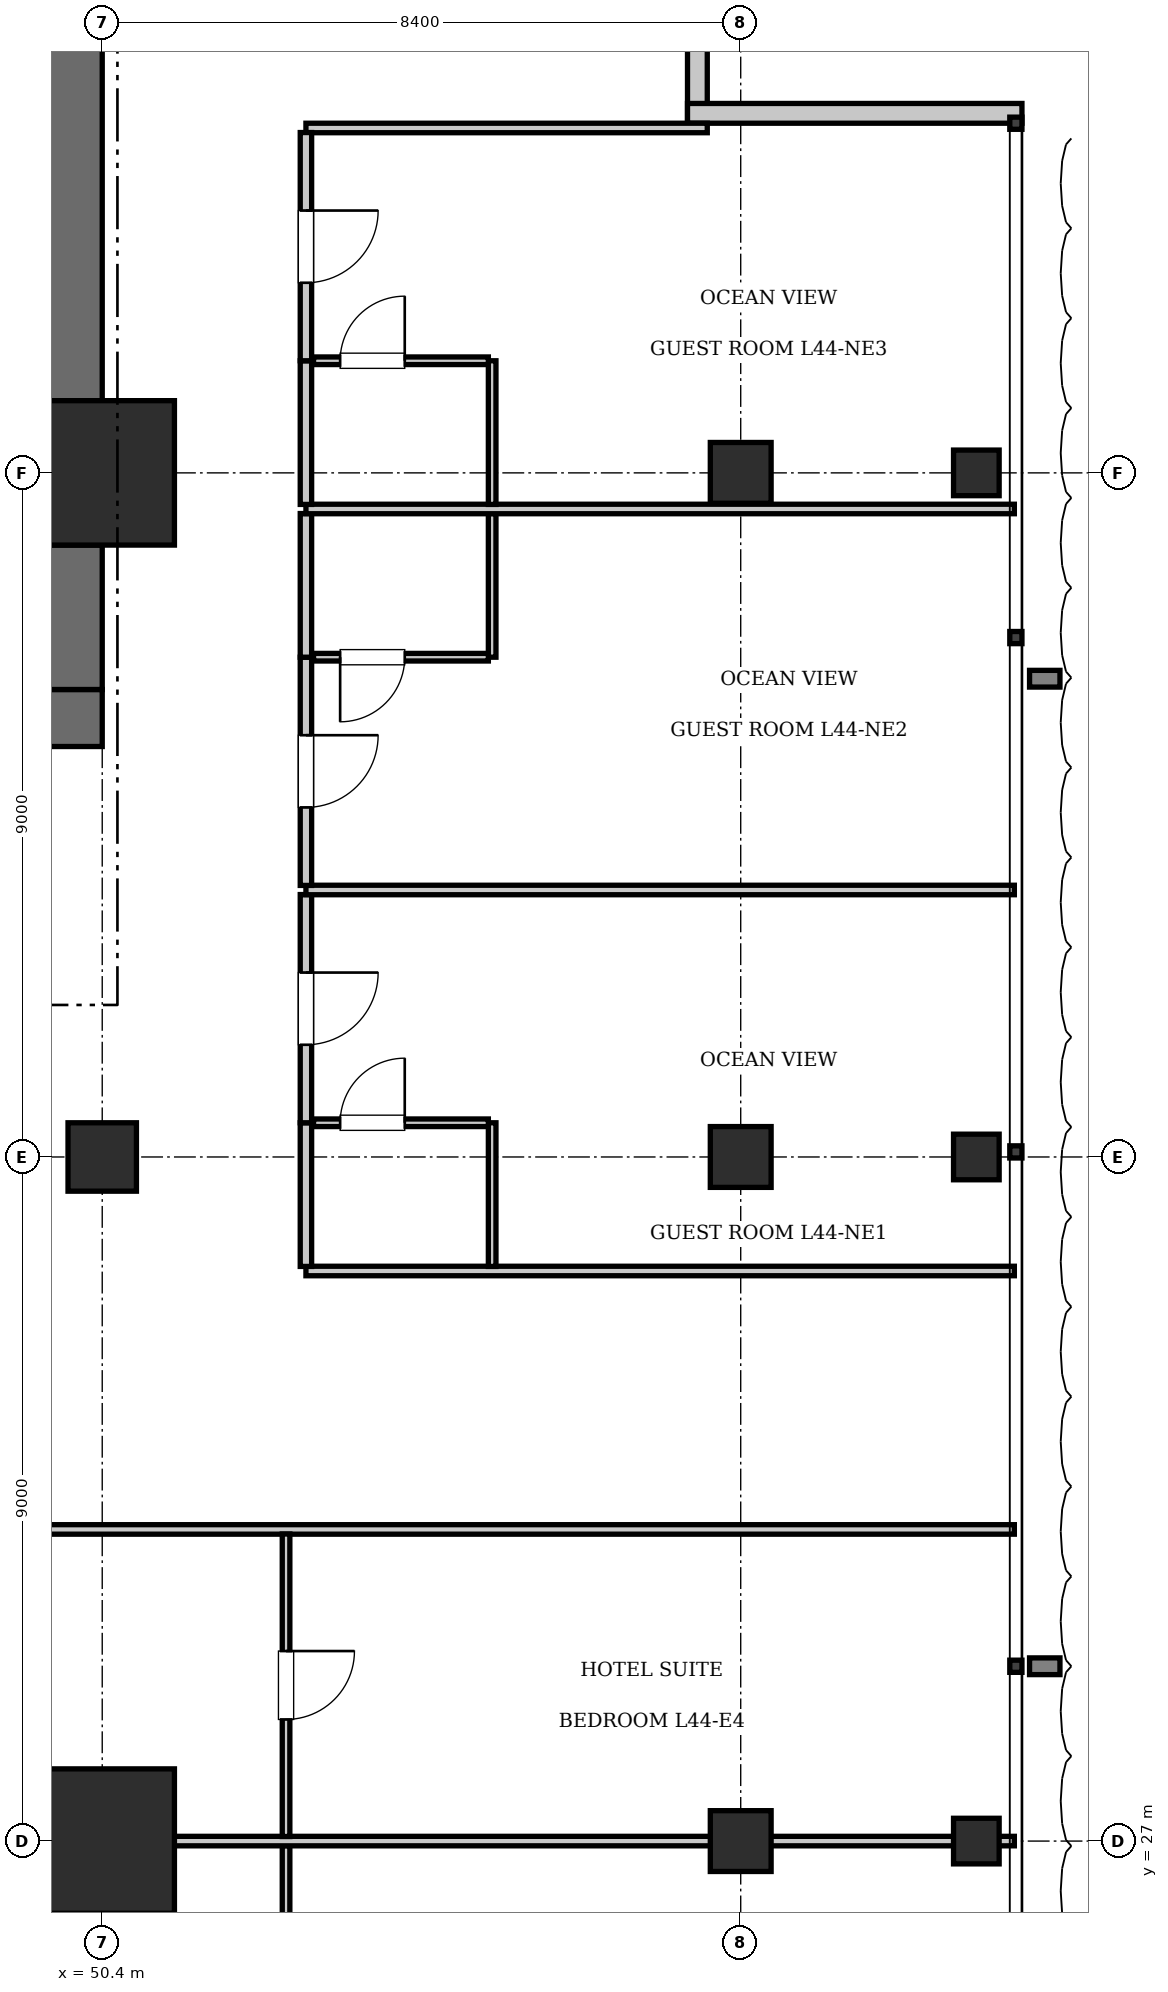
"""IFC4 building model, lengths in metres.
Left out: names, types, materials, properties, quantities, classifications, styles, units other than length and angle.
Written with IfcOpenShell. Run it as: python <this file> out.ifc"""

import sys

from ifc_helpers import new_model, si_unit, direction, frame, frame_2d, origin, origin_2d, place, context, subcontext, project, spatial, rectangle, i_section, extrude, element, fill, save


model = new_model("IFC4")
c1 = context("Model", 3, precision=1e-05, world=origin(), true_north=direction((0.0, 1.0)))
c2 = subcontext(c1, "Body", "Model", "MODEL_VIEW")
j1 = project(units=[si_unit("LENGTHUNIT", "METRE"), si_unit("PLANEANGLEUNIT", "RADIAN")], contexts=[c1])
p1 = place(None, origin())
s1 = spatial("IfcSite", under=j1, at=p1, CompositionType="ELEMENT")
p2 = place(p1, origin())
s2 = spatial("IfcBuilding", under=s1, at=p2, CompositionType="ELEMENT")
p3 = place(p2, frame((0.0, 0.0, 181.3)))
s3 = spatial("IfcBuildingStorey", under=s2, at=p3, CompositionType="ELEMENT", Elevation=181.3)
for number, where, z_axis, x_axis in (
    (1, (50.4, 27.0, 0.0), (0.0, 0.0, 1.0), (1.0, 0.0, 0.0)),
    (2, (50.4, 45.0, 0.0), (0.0, 0.0, 1.0), (1.0, 0.0, 0.0)),
):
    element("IfcColumn", number, at=place(p3, frame(where, z_axis=z_axis, x_axis=x_axis)), inside=s3, PredefinedType="COLUMN", context=c2, shape_type="SweptSolid", body=[
        extrude(rectangle(XDim=1.9, YDim=1.9, at=origin_2d()), origin(), (0.0, 0.0, 1.0), 3.85),
    ])
p4 = place(p3, frame((43.6, 41.775, 0.0), z_axis=(0.0, 0.0, 1.0), x_axis=(1.0, 0.0, 0.0)))
e3 = element("IfcWall", 3, at=p4, inside=s3, PredefinedType="SHEAR", context=c2, shape_type="SweptSolid", body=[
    extrude(rectangle(XDim=6.8, YDim=0.75, at=frame_2d((3.4, 0.0))), origin(), (0.0, 0.0, 1.0), 3.85),
])
p5 = place(p4, frame((3.9, 0.0, 0.0)))
e4 = element("IfcOpeningElement", 4, at=p5, cuts=e3, PredefinedType="OPENING", context=c2, shape_type="SweptSolid", body=[
    extrude(rectangle(XDim=1.15, YDim=2.15, at=frame_2d((0.575, 1.075))), frame((0.0, 0.385, 0.0), z_axis=(0.0, -1.0, 0.0), x_axis=(1.0, 0.0, 0.0)), (0.0, 0.0, 1.0), 0.77),
])
p6 = place(p4, frame((0.55, 0.0, 0.0)))
e5 = element("IfcOpeningElement", 5, at=p6, cuts=e3, PredefinedType="OPENING", context=c2, shape_type="SweptSolid", body=[
    extrude(rectangle(XDim=1.1, YDim=2.2, at=frame_2d((0.55, 1.1))), frame((0.0, 0.385, 0.0), z_axis=(0.0, -1.0, 0.0), x_axis=(1.0, 0.0, 0.0)), (0.0, 0.0, 1.0), 0.77),
])
p7 = place(p3, frame((50.025, 42.15, 0.0), z_axis=(0.0, 0.0, 1.0), x_axis=(0.0, 1.0, 0.0)))
e6 = element("IfcWall", 6, at=p7, inside=s3, PredefinedType="SHEAR", context=c2, shape_type="SweptSolid", body=[
    extrude(rectangle(XDim=1.9, YDim=0.75, at=frame_2d((0.95, 0.0))), origin(), (0.0, 0.0, 1.0), 3.85),
])
p8 = place(p3, frame((50.025, 45.95, 0.0), z_axis=(0.0, 0.0, 1.0), x_axis=(0.0, 1.0, 0.0)))
e7 = element("IfcWall", 7, at=p8, inside=s3, PredefinedType="SHEAR", context=c2, shape_type="SweptSolid", body=[
    extrude(rectangle(XDim=7.3, YDim=0.75, at=frame_2d((3.65, 0.0))), origin(), (0.0, 0.0, 1.0), 3.85),
])
p9 = place(p3, frame((50.4, 36.0, 0.0), z_axis=(0.0, 0.0, 1.0), x_axis=(1.0, 0.0, 0.0)))
e8 = element("IfcColumn", 8, at=p9, inside=s3, PredefinedType="COLUMN", context=c2, shape_type="SweptSolid", body=[
    extrude(rectangle(XDim=0.9, YDim=0.9, at=origin_2d()), origin(), (0.0, 0.0, 1.0), 3.85),
])
for number, where, z_axis, x_axis in (
    (9, (58.8, 27.0, 0.0), (0.0, 0.0, 1.0), (1.0, 0.0, 0.0)),
    (10, (58.8, 36.0, 0.0), (0.0, 0.0, 1.0), (1.0, 0.0, 0.0)),
    (11, (58.8, 45.0, 0.0), (0.0, 0.0, 1.0), (1.0, 0.0, 0.0)),
):
    element("IfcColumn", number, at=place(p3, frame(where, z_axis=z_axis, x_axis=x_axis)), inside=s3, PredefinedType="COLUMN", context=c2, shape_type="SweptSolid", body=[
        extrude(rectangle(XDim=0.8, YDim=0.8, at=origin_2d()), origin(), (0.0, 0.0, 1.0), 3.85),
    ])
for number, where, z_axis, x_axis in (
    (12, (61.9, 27.0, 0.0), (0.0, 0.0, 1.0), (1.0, 0.0, 0.0)),
    (13, (61.9, 36.0, 0.0), (0.0, 0.0, 1.0), (1.0, 0.0, 0.0)),
    (14, (61.9, 45.0, 0.0), (0.0, 0.0, 1.0), (1.0, 0.0, 0.0)),
):
    element("IfcColumn", number, at=place(p3, frame(where, z_axis=z_axis, x_axis=x_axis)), inside=s3, PredefinedType="COLUMN", context=c2, shape_type="SweptSolid", body=[
        extrude(i_section(OverallWidth=0.6, OverallDepth=0.6, WebThickness=0.025, FlangeThickness=0.038, at=origin_2d()), origin(), (0.0, 0.0, 1.0), 3.85),
    ])
for number, where, z_axis, x_axis in (
    (15, (58.23, 54.0, 0.0), (0.0, 0.0, 1.0), (0.0, -1.0, 0.0)),
    (16, (58.1, 49.73, 0.0), (0.0, 0.0, 1.0), (1.0, 0.0, 0.0)),
):
    element("IfcWall", number, at=place(p3, frame(where, z_axis=z_axis, x_axis=x_axis)), inside=s3, PredefinedType="SOLIDWALL", context=c2, shape_type="SweptSolid", body=[
        extrude(rectangle(XDim=4.4, YDim=0.26, at=frame_2d((2.2, 0.0))), origin(), (0.0, 0.0, 1.0), 3.61),
    ])
p10 = place(p3, frame((39.88, 31.1, 0.0), z_axis=(0.0, 0.0, 1.0), x_axis=(1.0, 0.0, 0.0)))
e17 = element("IfcWall", 17, at=p10, inside=s3, PredefinedType="PARTITIONING", context=c2, shape_type="SweptSolid", body=[
    extrude(rectangle(XDim=22.52, YDim=0.125, at=frame_2d((11.26, 0.0))), origin(), (0.0, 0.0, 1.0), 3.61),
])
p11 = place(p3, frame((52.818, 22.96, 0.0), z_axis=(0.0, 0.0, 1.0), x_axis=(0.0, 1.0, 0.0)))
e18 = element("IfcWall", 18, at=p11, inside=s3, PredefinedType="PARTITIONING", context=c2, shape_type="SweptSolid", body=[
    extrude(rectangle(XDim=3.98, YDim=0.1, at=frame_2d((1.99, 0.0))), origin(), (0.0, 0.0, 1.0), 3.61),
])
p12 = place(p11, frame((1.54, 0.0, 0.0)))
e19 = element("IfcOpeningElement", 19, at=p12, cuts=e18, PredefinedType="OPENING", context=c2, shape_type="SweptSolid", body=[
    extrude(rectangle(XDim=0.9, YDim=2.1, at=frame_2d((0.45, 1.05))), frame((0.0, 0.06, 0.0), z_axis=(0.0, -1.0, 0.0), x_axis=(1.0, 0.0, 0.0)), (0.0, 0.0, 1.0), 0.12),
])
p13 = place(p3, frame((39.88, 27.0, 0.0), z_axis=(0.0, 0.0, 1.0), x_axis=(1.0, 0.0, 0.0)))
e20 = element("IfcWall", 20, at=p13, inside=s3, PredefinedType="PARTITIONING", context=c2, shape_type="SweptSolid", body=[
    extrude(rectangle(XDim=22.52, YDim=0.125, at=frame_2d((11.26, 0.0))), origin(), (0.0, 0.0, 1.0), 2.41),
])
p14 = place(p3, frame((52.818, 27.06, 0.0), z_axis=(0.0, 0.0, 1.0), x_axis=(0.0, 1.0, 0.0)))
e21 = element("IfcWall", 21, at=p14, inside=s3, PredefinedType="PARTITIONING", context=c2, shape_type="SweptSolid", body=[
    extrude(rectangle(XDim=3.98, YDim=0.1, at=frame_2d((1.99, 0.0))), origin(), (0.0, 0.0, 1.0), 3.61),
])
p15 = place(p14, frame((1.54, 0.0, 0.0)))
e22 = element("IfcOpeningElement", 22, at=p15, cuts=e21, PredefinedType="OPENING", context=c2, shape_type="SweptSolid", body=[
    extrude(rectangle(XDim=0.9, YDim=2.1, at=frame_2d((0.45, 1.05))), frame((0.0, 0.06, 0.0), z_axis=(0.0, -1.0, 0.0), x_axis=(1.0, 0.0, 0.0)), (0.0, 0.0, 1.0), 0.12),
])
p16 = place(p3, frame((53.08, 34.5, 0.0), z_axis=(0.0, 0.0, 1.0), x_axis=(1.0, 0.0, 0.0)))
e23 = element("IfcWall", 23, at=p16, inside=s3, PredefinedType="PARTITIONING", context=c2, shape_type="SweptSolid", body=[
    extrude(rectangle(XDim=9.32, YDim=0.125, at=frame_2d((4.66, 0.0))), origin(), (0.0, 0.0, 1.0), 3.61),
])
p17 = place(p3, frame((53.08, 49.538, 0.0), z_axis=(0.0, 0.0, 1.0), x_axis=(1.0, 0.0, 0.0)))
e24 = element("IfcWall", 24, at=p17, inside=s3, PredefinedType="PARTITIONING", context=c2, shape_type="SweptSolid", body=[
    extrude(rectangle(XDim=5.28, YDim=0.125, at=frame_2d((2.64, 0.0))), origin(), (0.0, 0.0, 1.0), 3.61),
])
p18 = place(p3, frame((53.08, 34.56, 0.0), z_axis=(0.0, 0.0, 1.0), x_axis=(0.0, 1.0, 0.0)))
e25 = element("IfcWall", 25, at=p18, inside=s3, PredefinedType="PARTITIONING", context=c2, shape_type="SweptSolid", body=[
    extrude(rectangle(XDim=1.89, YDim=0.15, at=frame_2d((0.945, 0.0))), origin(), (0.0, 0.0, 1.0), 3.61),
])
p19 = place(p3, frame((53.08, 36.45, 0.0), z_axis=(0.0, 0.0, 1.0), x_axis=(0.0, 1.0, 0.0)))
e26 = element("IfcWall", 26, at=p19, inside=s3, PredefinedType="PARTITIONING", context=c2, shape_type="SweptSolid", body=[
    extrude(rectangle(XDim=3.002, YDim=0.15, at=frame_2d((1.501, 0.0))), origin(), (0.0, 0.0, 1.0), 3.61),
])
p20 = place(p19, frame((1.026, 0.0, 0.0)))
e27 = element("IfcOpeningElement", 27, at=p20, cuts=e26, PredefinedType="OPENING", context=c2, shape_type="SweptSolid", body=[
    extrude(rectangle(XDim=0.95, YDim=2.15, at=frame_2d((0.475, 1.075))), frame((0.0, 0.085, 0.0), z_axis=(0.0, -1.0, 0.0), x_axis=(1.0, 0.0, 0.0)), (0.0, 0.0, 1.0), 0.17),
])
p21 = place(p3, frame((55.53, 34.56, 0.0), z_axis=(0.0, 0.0, 1.0), x_axis=(0.0, 1.0, 0.0)))
e28 = element("IfcWall", 28, at=p21, inside=s3, PredefinedType="PARTITIONING", context=c2, shape_type="SweptSolid", body=[
    extrude(rectangle(XDim=1.89, YDim=0.1, at=frame_2d((0.945, 0.0))), origin(), (0.0, 0.0, 1.0), 3.61),
])
p22 = place(p3, frame((53.18, 36.45, 0.0), z_axis=(0.0, 0.0, 1.0), x_axis=(1.0, 0.0, 0.0)))
e29 = element("IfcWall", 29, at=p22, inside=s3, PredefinedType="PARTITIONING", context=c2, shape_type="SweptSolid", body=[
    extrude(rectangle(XDim=2.3, YDim=0.1, at=frame_2d((1.15, 0.0))), origin(), (0.0, 0.0, 1.0), 3.61),
])
p23 = place(p22, frame((0.35, 0.0, 0.0)))
e30 = element("IfcOpeningElement", 30, at=p23, cuts=e29, PredefinedType="OPENING", context=c2, shape_type="SweptSolid", body=[
    extrude(rectangle(XDim=0.85, YDim=2.1, at=frame_2d((0.425, 1.05))), frame((0.0, 0.06, 0.0), z_axis=(0.0, -1.0, 0.0), x_axis=(1.0, 0.0, 0.0)), (0.0, 0.0, 1.0), 0.12),
])
p24 = place(p3, frame((53.08, 39.512, 0.0), z_axis=(0.0, 0.0, 1.0), x_axis=(1.0, 0.0, 0.0)))
e31 = element("IfcWall", 31, at=p24, inside=s3, PredefinedType="PARTITIONING", context=c2, shape_type="SweptSolid", body=[
    extrude(rectangle(XDim=9.32, YDim=0.125, at=frame_2d((4.66, 0.0))), origin(), (0.0, 0.0, 1.0), 3.61),
])
p25 = place(p3, frame((53.08, 39.573, 0.0), z_axis=(0.0, 0.0, 1.0), x_axis=(0.0, 1.0, 0.0)))
e32 = element("IfcWall", 32, at=p25, inside=s3, PredefinedType="PARTITIONING", context=c2, shape_type="SweptSolid", body=[
    extrude(rectangle(XDim=3.002, YDim=0.15, at=frame_2d((1.501, 0.0))), origin(), (0.0, 0.0, 1.0), 3.61),
])
p26 = place(p25, frame((1.026, 0.0, 0.0)))
e33 = element("IfcOpeningElement", 33, at=p26, cuts=e32, PredefinedType="OPENING", context=c2, shape_type="SweptSolid", body=[
    extrude(rectangle(XDim=0.95, YDim=2.15, at=frame_2d((0.475, 1.075))), frame((0.0, 0.085, 0.0), z_axis=(0.0, -1.0, 0.0), x_axis=(1.0, 0.0, 0.0)), (0.0, 0.0, 1.0), 0.17),
])
p27 = place(p3, frame((53.08, 42.575, 0.0), z_axis=(0.0, 0.0, 1.0), x_axis=(0.0, 1.0, 0.0)))
e34 = element("IfcWall", 34, at=p27, inside=s3, PredefinedType="PARTITIONING", context=c2, shape_type="SweptSolid", body=[
    extrude(rectangle(XDim=1.89, YDim=0.15, at=frame_2d((0.945, 0.0))), origin(), (0.0, 0.0, 1.0), 3.61),
])
p28 = place(p3, frame((55.53, 42.575, 0.0), z_axis=(0.0, 0.0, 1.0), x_axis=(0.0, 1.0, 0.0)))
e35 = element("IfcWall", 35, at=p28, inside=s3, PredefinedType="PARTITIONING", context=c2, shape_type="SweptSolid", body=[
    extrude(rectangle(XDim=1.89, YDim=0.1, at=frame_2d((0.945, 0.0))), origin(), (0.0, 0.0, 1.0), 3.61),
])
p29 = place(p3, frame((53.18, 42.575, 0.0), z_axis=(0.0, 0.0, 1.0), x_axis=(1.0, 0.0, 0.0)))
e36 = element("IfcWall", 36, at=p29, inside=s3, PredefinedType="PARTITIONING", context=c2, shape_type="SweptSolid", body=[
    extrude(rectangle(XDim=2.3, YDim=0.1, at=frame_2d((1.15, 0.0))), origin(), (0.0, 0.0, 1.0), 3.61),
])
p30 = place(p29, frame((0.35, 0.0, 0.0)))
e37 = element("IfcOpeningElement", 37, at=p30, cuts=e36, PredefinedType="OPENING", context=c2, shape_type="SweptSolid", body=[
    extrude(rectangle(XDim=0.85, YDim=2.1, at=frame_2d((0.425, 1.05))), frame((0.0, 0.06, 0.0), z_axis=(0.0, -1.0, 0.0), x_axis=(1.0, 0.0, 0.0)), (0.0, 0.0, 1.0), 0.12),
])
p31 = place(p3, frame((53.08, 44.525, 0.0), z_axis=(0.0, 0.0, 1.0), x_axis=(1.0, 0.0, 0.0)))
e38 = element("IfcWall", 38, at=p31, inside=s3, PredefinedType="PARTITIONING", context=c2, shape_type="SweptSolid", body=[
    extrude(rectangle(XDim=9.32, YDim=0.125, at=frame_2d((4.66, 0.0))), origin(), (0.0, 0.0, 1.0), 3.61),
])
p32 = place(p3, frame((53.08, 44.585, 0.0), z_axis=(0.0, 0.0, 1.0), x_axis=(0.0, 1.0, 0.0)))
e39 = element("IfcWall", 39, at=p32, inside=s3, PredefinedType="PARTITIONING", context=c2, shape_type="SweptSolid", body=[
    extrude(rectangle(XDim=1.89, YDim=0.15, at=frame_2d((0.945, 0.0))), origin(), (0.0, 0.0, 1.0), 3.61),
])
p33 = place(p3, frame((53.08, 46.475, 0.0), z_axis=(0.0, 0.0, 1.0), x_axis=(0.0, 1.0, 0.0)))
e40 = element("IfcWall", 40, at=p33, inside=s3, PredefinedType="PARTITIONING", context=c2, shape_type="SweptSolid", body=[
    extrude(rectangle(XDim=3.002, YDim=0.15, at=frame_2d((1.501, 0.0))), origin(), (0.0, 0.0, 1.0), 3.61),
])
p34 = place(p33, frame((1.026, 0.0, 0.0)))
e41 = element("IfcOpeningElement", 41, at=p34, cuts=e40, PredefinedType="OPENING", context=c2, shape_type="SweptSolid", body=[
    extrude(rectangle(XDim=0.95, YDim=2.15, at=frame_2d((0.475, 1.075))), frame((0.0, 0.085, 0.0), z_axis=(0.0, -1.0, 0.0), x_axis=(1.0, 0.0, 0.0)), (0.0, 0.0, 1.0), 0.17),
])
p35 = place(p3, frame((55.53, 44.585, 0.0), z_axis=(0.0, 0.0, 1.0), x_axis=(0.0, 1.0, 0.0)))
e42 = element("IfcWall", 42, at=p35, inside=s3, PredefinedType="PARTITIONING", context=c2, shape_type="SweptSolid", body=[
    extrude(rectangle(XDim=1.89, YDim=0.1, at=frame_2d((0.945, 0.0))), origin(), (0.0, 0.0, 1.0), 3.61),
])
p36 = place(p3, frame((53.18, 46.475, 0.0), z_axis=(0.0, 0.0, 1.0), x_axis=(1.0, 0.0, 0.0)))
e43 = element("IfcWall", 43, at=p36, inside=s3, PredefinedType="PARTITIONING", context=c2, shape_type="SweptSolid", body=[
    extrude(rectangle(XDim=2.3, YDim=0.1, at=frame_2d((1.15, 0.0))), origin(), (0.0, 0.0, 1.0), 3.61),
])
p37 = place(p36, frame((0.35, 0.0, 0.0)))
e44 = element("IfcOpeningElement", 44, at=p37, cuts=e43, PredefinedType="OPENING", context=c2, shape_type="SweptSolid", body=[
    extrude(rectangle(XDim=0.85, YDim=2.1, at=frame_2d((0.425, 1.05))), frame((0.0, 0.06, 0.0), z_axis=(0.0, -1.0, 0.0), x_axis=(1.0, 0.0, 0.0)), (0.0, 0.0, 1.0), 0.12),
])
p38 = place(p15, frame((0.9, 0.0, 0.0), z_axis=(0.0, 0.0, 1.0), x_axis=(-1.0, 0.0, 0.0)))
e45 = element("IfcDoor", 45, at=p38, inside=s3, OperationType="SINGLE_SWING_LEFT", PredefinedType="DOOR", context=c2, shape_type="SweptSolid", body=[
    extrude(rectangle(XDim=0.9, YDim=2.1, at=frame_2d((0.45, 1.05))), frame((0.0, 0.025, 0.0), z_axis=(0.0, -1.0, 0.0), x_axis=(1.0, 0.0, 0.0)), (0.0, 0.0, 1.0), 0.05),
])
fill(e22, e45)
p39 = place(p23, origin())
e46 = element("IfcDoor", 46, at=p39, inside=s3, OperationType="SINGLE_SWING_RIGHT", PredefinedType="DOOR", context=c2, shape_type="SweptSolid", body=[
    extrude(rectangle(XDim=0.85, YDim=2.1, at=frame_2d((0.425, 1.05))), frame((0.0, 0.025, 0.0), z_axis=(0.0, -1.0, 0.0), x_axis=(1.0, 0.0, 0.0)), (0.0, 0.0, 1.0), 0.05),
])
fill(e30, e46)
p40 = place(p20, frame((0.95, 0.0, 0.0), z_axis=(0.0, 0.0, 1.0), x_axis=(-1.0, 0.0, 0.0)))
e47 = element("IfcDoor", 47, at=p40, inside=s3, OperationType="SINGLE_SWING_LEFT", PredefinedType="DOOR", context=c2, shape_type="SweptSolid", body=[
    extrude(rectangle(XDim=0.95, YDim=2.15, at=frame_2d((0.475, 1.075))), frame((0.0, 0.025, 0.0), z_axis=(0.0, -1.0, 0.0), x_axis=(1.0, 0.0, 0.0)), (0.0, 0.0, 1.0), 0.05),
])
fill(e27, e47)
p41 = place(p30, frame((0.85, 0.0, 0.0), z_axis=(0.0, 0.0, 1.0), x_axis=(-1.0, 0.0, 0.0)))
e48 = element("IfcDoor", 48, at=p41, inside=s3, OperationType="SINGLE_SWING_RIGHT", PredefinedType="DOOR", context=c2, shape_type="SweptSolid", body=[
    extrude(rectangle(XDim=0.85, YDim=2.1, at=frame_2d((0.425, 1.05))), frame((0.0, 0.025, 0.0), z_axis=(0.0, -1.0, 0.0), x_axis=(1.0, 0.0, 0.0)), (0.0, 0.0, 1.0), 0.05),
])
fill(e37, e48)
p42 = place(p26, frame((0.95, 0.0, 0.0), z_axis=(0.0, 0.0, 1.0), x_axis=(-1.0, 0.0, 0.0)))
e49 = element("IfcDoor", 49, at=p42, inside=s3, OperationType="SINGLE_SWING_LEFT", PredefinedType="DOOR", context=c2, shape_type="SweptSolid", body=[
    extrude(rectangle(XDim=0.95, YDim=2.15, at=frame_2d((0.475, 1.075))), frame((0.0, 0.025, 0.0), z_axis=(0.0, -1.0, 0.0), x_axis=(1.0, 0.0, 0.0)), (0.0, 0.0, 1.0), 0.05),
])
fill(e33, e49)
p43 = place(p37, origin())
e50 = element("IfcDoor", 50, at=p43, inside=s3, OperationType="SINGLE_SWING_RIGHT", PredefinedType="DOOR", context=c2, shape_type="SweptSolid", body=[
    extrude(rectangle(XDim=0.85, YDim=2.1, at=frame_2d((0.425, 1.05))), frame((0.0, 0.025, 0.0), z_axis=(0.0, -1.0, 0.0), x_axis=(1.0, 0.0, 0.0)), (0.0, 0.0, 1.0), 0.05),
])
fill(e44, e50)
p44 = place(p34, frame((0.95, 0.0, 0.0), z_axis=(0.0, 0.0, 1.0), x_axis=(-1.0, 0.0, 0.0)))
e51 = element("IfcDoor", 51, at=p44, inside=s3, OperationType="SINGLE_SWING_LEFT", PredefinedType="DOOR", context=c2, shape_type="SweptSolid", body=[
    extrude(rectangle(XDim=0.95, YDim=2.15, at=frame_2d((0.475, 1.075))), frame((0.0, 0.025, 0.0), z_axis=(0.0, -1.0, 0.0), x_axis=(1.0, 0.0, 0.0)), (0.0, 0.0, 1.0), 0.05),
])
fill(e41, e51)
save(model, sys.argv[1])
